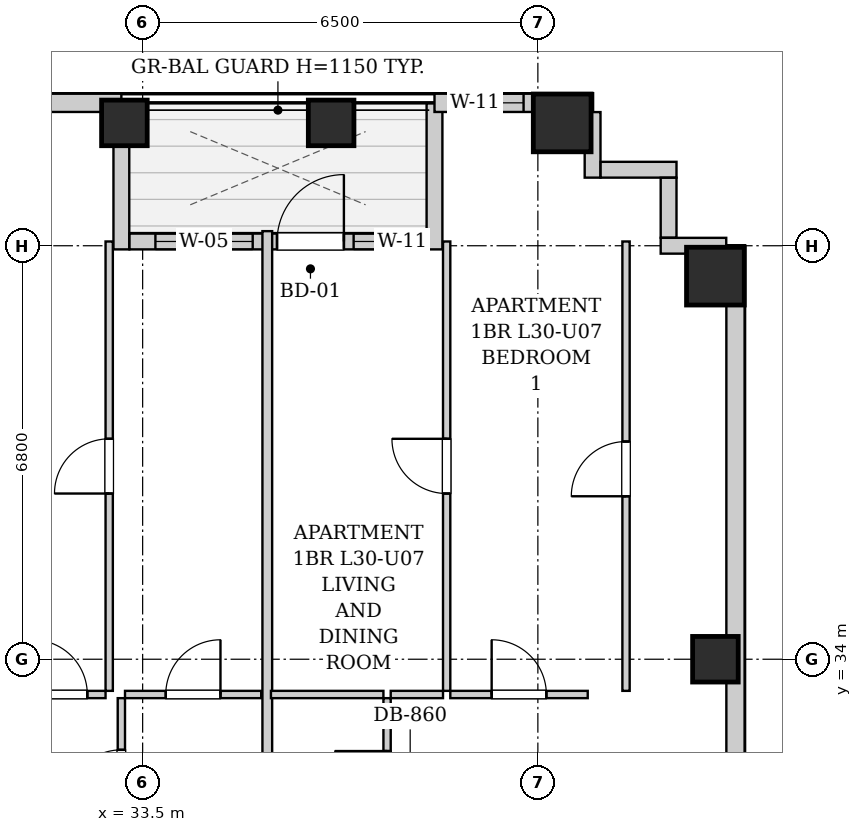
"""IFC4 building model, lengths in metres.
Left out: names, types, materials, properties, quantities, classifications, styles, units other than length and angle.
Written with IfcOpenShell. Run it as: python <this file> out.ifc"""

import sys

from ifc_helpers import new_model, si_unit, direction, frame, frame_2d, origin, origin_2d, place, context, subcontext, project, spatial, rectangle, extrude, element, fill, save


model = new_model("IFC4")
c1 = context("Model", 3, precision=1e-05, world=origin(), true_north=direction((0.0, 1.0)))
c2 = subcontext(c1, "Body", "Model", "MODEL_VIEW")
j1 = project(units=[si_unit("LENGTHUNIT", "METRE"), si_unit("PLANEANGLEUNIT", "RADIAN")], contexts=[c1])
p1 = place(None, origin())
s1 = spatial("IfcSite", under=j1, at=p1, CompositionType="ELEMENT")
p2 = place(p1, origin())
s2 = spatial("IfcBuilding", under=s1, at=p2, CompositionType="ELEMENT")
p3 = place(p2, frame((0.0, 0.0, 107.1)))
s3 = spatial("IfcBuildingStorey", under=s2, at=p3, CompositionType="ELEMENT", Elevation=107.1)
for number, where, z_axis, x_axis in (
    (1, (33.2, 42.82, 0.0), (0.0, 0.0, 1.0), (1.0, 0.0, 0.0)),
    (2, (36.6, 42.82, 0.0), (0.0, 0.0, 1.0), (1.0, 0.0, 0.0)),
):
    element("IfcColumn", number, at=place(p3, frame(where, z_axis=z_axis, x_axis=x_axis)), inside=s3, PredefinedType="COLUMN", context=c2, shape_type="SweptSolid", body=[
        extrude(rectangle(XDim=0.75, YDim=0.75, at=origin_2d()), origin(), (0.0, 0.0, 1.0), 3.2),
    ])
p4 = place(p3, frame((40.4, 42.82, 0.0), z_axis=(0.0, 0.0, 1.0), x_axis=(1.0, 0.0, 0.0)))
e3 = element("IfcColumn", 3, at=p4, inside=s3, PredefinedType="COLUMN", context=c2, shape_type="SweptSolid", body=[
    extrude(rectangle(XDim=0.95, YDim=0.95, at=origin_2d()), origin(), (0.0, 0.0, 1.0), 3.2),
])
p5 = place(p3, frame((42.92, 34.0, 0.0), z_axis=(0.0, 0.0, 1.0), x_axis=(1.0, 0.0, 0.0)))
e4 = element("IfcColumn", 4, at=p5, inside=s3, PredefinedType="COLUMN", context=c2, shape_type="SweptSolid", body=[
    extrude(rectangle(XDim=0.75, YDim=0.75, at=origin_2d()), origin(), (0.0, 0.0, 1.0), 3.2),
])
p6 = place(p3, frame((42.92, 40.3, 0.0), z_axis=(0.0, 0.0, 1.0), x_axis=(1.0, 0.0, 0.0)))
e5 = element("IfcColumn", 5, at=p6, inside=s3, PredefinedType="COLUMN", context=c2, shape_type="SweptSolid", body=[
    extrude(rectangle(XDim=0.95, YDim=0.95, at=origin_2d()), origin(), (0.0, 0.0, 1.0), 3.2),
])
p7 = place(p3, frame((10.0, 43.15, 0.0), z_axis=(0.0, 0.0, 1.0), x_axis=(1.0, 0.0, 0.0)))
e6 = element("IfcWall", 6, at=p7, inside=s3, PredefinedType="SOLIDWALL", context=c2, shape_type="SweptSolid", body=[
    extrude(rectangle(XDim=23.15, YDim=0.3, at=frame_2d((11.575, 0.0))), origin(), (0.0, 0.0, 1.0), 2.94),
])
p8 = place(p7, frame((4.735, 0.0, 0.55)))
e7 = element("IfcOpeningElement", 7, at=p8, cuts=e6, PredefinedType="OPENING", context=c2, shape_type="SweptSolid", body=[
    extrude(rectangle(XDim=1.35, YDim=1.2, at=frame_2d((0.675, 0.6))), frame((0.0, 0.16, 0.0), z_axis=(0.0, -1.0, 0.0), x_axis=(1.0, 0.0, 0.0)), (0.0, 0.0, 1.0), 0.32),
])
p9 = place(p7, frame((1.27, 0.0, 0.55)))
e8 = element("IfcOpeningElement", 8, at=p9, cuts=e6, PredefinedType="OPENING", context=c2, shape_type="SweptSolid", body=[
    extrude(rectangle(XDim=1.35, YDim=1.2, at=frame_2d((0.675, 0.6))), frame((0.0, 0.16, 0.0), z_axis=(0.0, -1.0, 0.0), x_axis=(1.0, 0.0, 0.0)), (0.0, 0.0, 1.0), 0.32),
])
p10 = place(p7, frame((9.773, 0.0, 0.55)))
e9 = element("IfcOpeningElement", 9, at=p10, cuts=e6, PredefinedType="OPENING", context=c2, shape_type="SweptSolid", body=[
    extrude(rectangle(XDim=1.35, YDim=1.2, at=frame_2d((0.675, 0.6))), frame((0.0, 0.16, 0.0), z_axis=(0.0, -1.0, 0.0), x_axis=(1.0, 0.0, 0.0)), (0.0, 0.0, 1.0), 0.32),
])
p11 = place(p7, frame((17.5, 0.0, 0.55)))
e10 = element("IfcOpeningElement", 10, at=p11, cuts=e6, PredefinedType="OPENING", context=c2, shape_type="SweptSolid", body=[
    extrude(rectangle(XDim=0.85, YDim=1.2, at=frame_2d((0.425, 0.6))), frame((0.0, 0.16, 0.0), z_axis=(0.0, -1.0, 0.0), x_axis=(1.0, 0.0, 0.0)), (0.0, 0.0, 1.0), 0.32),
])
p12 = place(p7, frame((19.393, 0.0, 0.55)))
e11 = element("IfcOpeningElement", 11, at=p12, cuts=e6, PredefinedType="OPENING", context=c2, shape_type="SweptSolid", body=[
    extrude(rectangle(XDim=1.35, YDim=1.2, at=frame_2d((0.675, 0.6))), frame((0.0, 0.16, 0.0), z_axis=(0.0, -1.0, 0.0), x_axis=(1.0, 0.0, 0.0)), (0.0, 0.0, 1.0), 0.32),
])
p13 = place(p3, frame((33.15, 43.14, 0.0), z_axis=(0.0, 0.0, 1.0), x_axis=(0.0, -1.0, 0.0)))
e12 = element("IfcWall", 12, at=p13, inside=s3, PredefinedType="SOLIDWALL", context=c2, shape_type="SweptSolid", body=[
    extrude(rectangle(XDim=2.4, YDim=0.26, at=frame_2d((1.2, 0.0))), origin(), (0.0, 0.0, 1.0), 2.313),
])
p14 = place(p3, frame((33.284, 40.87, 0.0), z_axis=(0.0, 0.0, 1.0), x_axis=(1.0, 0.0, 0.0)))
e13 = element("IfcWall", 13, at=p14, inside=s3, PredefinedType="SOLIDWALL", context=c2, shape_type="SweptSolid", body=[
    extrude(rectangle(XDim=4.882, YDim=0.26, at=frame_2d((2.441, 0.0))), origin(), (0.0, 0.0, 1.0), 2.94),
])
p15 = place(p14, frame((2.426, 0.0, 0.0)))
e14 = element("IfcOpeningElement", 14, at=p15, cuts=e13, PredefinedType="OPENING", context=c2, shape_type="SweptSolid", body=[
    extrude(rectangle(XDim=1.1, YDim=2.0, at=frame_2d((0.55, 1.0))), frame((0.0, 0.14, 0.0), z_axis=(0.0, -1.0, 0.0), x_axis=(1.0, 0.0, 0.0)), (0.0, 0.0, 1.0), 0.28),
])
p16 = place(p14, frame((0.426, 0.0, 0.85)))
e15 = element("IfcOpeningElement", 15, at=p16, cuts=e13, PredefinedType="OPENING", context=c2, shape_type="SweptSolid", body=[
    extrude(rectangle(XDim=1.6, YDim=1.65, at=frame_2d((0.8, 0.825))), frame((0.0, 0.14, 0.0), z_axis=(0.0, -1.0, 0.0), x_axis=(1.0, 0.0, 0.0)), (0.0, 0.0, 1.0), 0.28),
])
p17 = place(p14, frame((3.686, 0.0, 0.55)))
e16 = element("IfcOpeningElement", 16, at=p17, cuts=e13, PredefinedType="OPENING", context=c2, shape_type="SweptSolid", body=[
    extrude(rectangle(XDim=0.85, YDim=1.2, at=frame_2d((0.425, 0.6))), frame((0.0, 0.14, 0.0), z_axis=(0.0, -1.0, 0.0), x_axis=(1.0, 0.0, 0.0)), (0.0, 0.0, 1.0), 0.28),
])
p18 = place(p3, frame((38.3, 40.74, 0.0), z_axis=(0.0, 0.0, 1.0), x_axis=(0.0, 1.0, 0.0)))
e17 = element("IfcWall", 17, at=p18, inside=s3, PredefinedType="SOLIDWALL", context=c2, shape_type="SweptSolid", body=[
    extrude(rectangle(XDim=2.4, YDim=0.26, at=frame_2d((1.2, 0.0))), origin(), (0.0, 0.0, 1.0), 2.94),
])
p19 = place(p3, frame((38.3, 43.15, 0.0), z_axis=(0.0, 0.0, 1.0), x_axis=(1.0, 0.0, 0.0)))
e18 = element("IfcWall", 18, at=p19, inside=s3, PredefinedType="SOLIDWALL", context=c2, shape_type="SweptSolid", body=[
    extrude(rectangle(XDim=2.6, YDim=0.3, at=frame_2d((1.3, 0.0))), origin(), (0.0, 0.0, 1.0), 2.94),
])
p20 = place(p19, frame((0.615, 0.0, 0.55)))
e19 = element("IfcOpeningElement", 19, at=p20, cuts=e18, PredefinedType="OPENING", context=c2, shape_type="SweptSolid", body=[
    extrude(rectangle(XDim=0.85, YDim=1.2, at=frame_2d((0.425, 0.6))), frame((0.0, 0.16, 0.0), z_axis=(0.0, -1.0, 0.0), x_axis=(1.0, 0.0, 0.0)), (0.0, 0.0, 1.0), 0.32),
])
p21 = place(p3, frame((43.25, 40.8, 0.0), z_axis=(0.0, 0.0, 1.0), x_axis=(0.0, -1.0, 0.0)))
e20 = element("IfcWall", 20, at=p21, inside=s3, PredefinedType="SOLIDWALL", context=c2, shape_type="SweptSolid", body=[
    extrude(rectangle(XDim=38.3, YDim=0.3, at=frame_2d((19.15, 0.0))), origin(), (0.0, 0.0, 1.0), 2.94),
])
p22 = place(p21, frame((33.495, 0.0, 0.55)))
e21 = element("IfcOpeningElement", 21, at=p22, cuts=e20, PredefinedType="OPENING", context=c2, shape_type="SweptSolid", body=[
    extrude(rectangle(XDim=1.35, YDim=1.2, at=frame_2d((0.675, 0.6))), frame((0.0, 0.16, 0.0), z_axis=(0.0, -1.0, 0.0), x_axis=(1.0, 0.0, 0.0)), (0.0, 0.0, 1.0), 0.32),
])
p23 = place(p21, frame((31.735, 0.0, 0.55)))
e22 = element("IfcOpeningElement", 22, at=p23, cuts=e20, PredefinedType="OPENING", context=c2, shape_type="SweptSolid", body=[
    extrude(rectangle(XDim=1.35, YDim=1.2, at=frame_2d((0.675, 0.6))), frame((0.0, 0.16, 0.0), z_axis=(0.0, -1.0, 0.0), x_axis=(1.0, 0.0, 0.0)), (0.0, 0.0, 1.0), 0.32),
])
p24 = place(p21, frame((21.93, 0.0, 0.55)))
e23 = element("IfcOpeningElement", 23, at=p24, cuts=e20, PredefinedType="OPENING", context=c2, shape_type="SweptSolid", body=[
    extrude(rectangle(XDim=1.35, YDim=1.2, at=frame_2d((0.675, 0.6))), frame((0.0, 0.16, 0.0), z_axis=(0.0, -1.0, 0.0), x_axis=(1.0, 0.0, 0.0)), (0.0, 0.0, 1.0), 0.32),
])
p25 = place(p21, frame((23.54, 0.0, 0.55)))
e24 = element("IfcOpeningElement", 24, at=p25, cuts=e20, PredefinedType="OPENING", context=c2, shape_type="SweptSolid", body=[
    extrude(rectangle(XDim=1.35, YDim=1.2, at=frame_2d((0.675, 0.6))), frame((0.0, 0.16, 0.0), z_axis=(0.0, -1.0, 0.0), x_axis=(1.0, 0.0, 0.0)), (0.0, 0.0, 1.0), 0.32),
])
p26 = place(p21, frame((14.95, 0.0, 0.55)))
e25 = element("IfcOpeningElement", 25, at=p26, cuts=e20, PredefinedType="OPENING", context=c2, shape_type="SweptSolid", body=[
    extrude(rectangle(XDim=1.35, YDim=1.2, at=frame_2d((0.675, 0.6))), frame((0.0, 0.16, 0.0), z_axis=(0.0, -1.0, 0.0), x_axis=(1.0, 0.0, 0.0)), (0.0, 0.0, 1.0), 0.32),
])
p27 = place(p21, frame((12.335, 0.0, 0.55)))
e26 = element("IfcOpeningElement", 26, at=p27, cuts=e20, PredefinedType="OPENING", context=c2, shape_type="SweptSolid", body=[
    extrude(rectangle(XDim=1.35, YDim=1.2, at=frame_2d((0.675, 0.6))), frame((0.0, 0.16, 0.0), z_axis=(0.0, -1.0, 0.0), x_axis=(1.0, 0.0, 0.0)), (0.0, 0.0, 1.0), 0.32),
])
p28 = place(p3, frame((40.9, 42.998, 0.0), z_axis=(0.0, 0.0, 1.0), x_axis=(0.0, -1.0, 0.0)))
e27 = element("IfcWall", 27, at=p28, inside=s3, PredefinedType="SOLIDWALL", context=c2, shape_type="SweptSolid", body=[
    extrude(rectangle(XDim=1.078, YDim=0.26, at=frame_2d((0.539, 0.0))), origin(), (0.0, 0.0, 1.0), 2.94),
])
p29 = place(p3, frame((41.032, 42.05, 0.0), z_axis=(0.0, 0.0, 1.0), x_axis=(1.0, 0.0, 0.0)))
e28 = element("IfcWall", 28, at=p29, inside=s3, PredefinedType="SOLIDWALL", context=c2, shape_type="SweptSolid", body=[
    extrude(rectangle(XDim=1.248, YDim=0.26, at=frame_2d((0.624, 0.0))), origin(), (0.0, 0.0, 1.0), 2.94),
])
p30 = place(p3, frame((42.15, 41.918, 0.0), z_axis=(0.0, 0.0, 1.0), x_axis=(0.0, -1.0, 0.0)))
e29 = element("IfcWall", 29, at=p30, inside=s3, PredefinedType="SOLIDWALL", context=c2, shape_type="SweptSolid", body=[
    extrude(rectangle(XDim=0.986, YDim=0.26, at=frame_2d((0.493, 0.0))), origin(), (0.0, 0.0, 1.0), 2.94),
])
p31 = place(p3, frame((42.02, 40.8, 0.0), z_axis=(0.0, 0.0, 1.0), x_axis=(1.0, 0.0, 0.0)))
e30 = element("IfcWall", 30, at=p31, inside=s3, PredefinedType="SOLIDWALL", context=c2, shape_type="SweptSolid", body=[
    extrude(rectangle(XDim=1.078, YDim=0.26, at=frame_2d((0.539, 0.0))), origin(), (0.0, 0.0, 1.0), 2.94),
])
p32 = place(p3, frame((33.15, 30.76, 0.0), z_axis=(0.0, 0.0, 1.0), x_axis=(0.0, 1.0, 0.0)))
e31 = element("IfcWall", 31, at=p32, inside=s3, PredefinedType="PARTITIONING", context=c2, shape_type="SweptSolid", body=[
    extrude(rectangle(XDim=2.6, YDim=0.12, at=frame_2d((1.3, 0.0))), origin(), (0.0, 0.0, 1.0), 2.313),
])
p33 = place(p32, frame((0.85, 0.0, 0.0)))
e32 = element("IfcOpeningElement", 32, at=p33, cuts=e31, PredefinedType="OPENING", context=c2, shape_type="SweptSolid", body=[
    extrude(rectangle(XDim=0.9, YDim=2.05, at=frame_2d((0.45, 1.025))), frame((0.0, 0.07, 0.0), z_axis=(0.0, -1.0, 0.0), x_axis=(1.0, 0.0, 0.0)), (0.0, 0.0, 1.0), 0.14),
])
p34 = place(p3, frame((31.39, 33.42, 0.0), z_axis=(0.0, 0.0, 1.0), x_axis=(1.0, 0.0, 0.0)))
e33 = element("IfcWall", 33, at=p34, inside=s3, PredefinedType="PARTITIONING", context=c2, shape_type="SweptSolid", body=[
    extrude(rectangle(XDim=1.5, YDim=0.12, at=frame_2d((0.75, 0.0))), origin(), (0.0, 0.0, 1.0), 2.94),
])
p35 = place(p34, frame((0.3, 0.0, 0.0)))
e34 = element("IfcOpeningElement", 34, at=p35, cuts=e33, PredefinedType="OPENING", context=c2, shape_type="SweptSolid", body=[
    extrude(rectangle(XDim=0.9, YDim=2.05, at=frame_2d((0.45, 1.025))), frame((0.0, 0.07, 0.0), z_axis=(0.0, -1.0, 0.0), x_axis=(1.0, 0.0, 0.0)), (0.0, 0.0, 1.0), 0.14),
])
p36 = place(p3, frame((33.21, 33.42, 0.0), z_axis=(0.0, 0.0, 1.0), x_axis=(1.0, 0.0, 0.0)))
e35 = element("IfcWall", 35, at=p36, inside=s3, PredefinedType="PARTITIONING", context=c2, shape_type="SweptSolid", body=[
    extrude(rectangle(XDim=2.24, YDim=0.12, at=frame_2d((1.12, 0.0))), origin(), (0.0, 0.0, 1.0), 2.94),
])
p37 = place(p36, frame((0.67, 0.0, 0.0)))
e36 = element("IfcOpeningElement", 36, at=p37, cuts=e35, PredefinedType="OPENING", context=c2, shape_type="SweptSolid", body=[
    extrude(rectangle(XDim=0.9, YDim=2.05, at=frame_2d((0.45, 1.025))), frame((0.0, 0.07, 0.0), z_axis=(0.0, -1.0, 0.0), x_axis=(1.0, 0.0, 0.0)), (0.0, 0.0, 1.0), 0.14),
])
p38 = place(p3, frame((32.95, 33.48, 0.0), z_axis=(0.0, 0.0, 1.0), x_axis=(0.0, 1.0, 0.0)))
e37 = element("IfcWall", 37, at=p38, inside=s3, PredefinedType="PARTITIONING", context=c2, shape_type="SweptSolid", body=[
    extrude(rectangle(XDim=7.39, YDim=0.12, at=frame_2d((3.695, 0.0))), origin(), (0.0, 0.0, 1.0), 2.94),
])
p39 = place(p38, frame((3.245, 0.0, 0.0)))
e38 = element("IfcOpeningElement", 38, at=p39, cuts=e37, PredefinedType="OPENING", context=c2, shape_type="SweptSolid", body=[
    extrude(rectangle(XDim=0.9, YDim=2.05, at=frame_2d((0.45, 1.025))), frame((0.0, 0.07, 0.0), z_axis=(0.0, -1.0, 0.0), x_axis=(1.0, 0.0, 0.0)), (0.0, 0.0, 1.0), 0.14),
])
p40 = place(p3, frame((35.55, 30.76, 0.0), z_axis=(0.0, 0.0, 1.0), x_axis=(0.0, 1.0, 0.0)))
e39 = element("IfcWall", 39, at=p40, inside=s3, PredefinedType="PARTITIONING", context=c2, shape_type="SweptSolid", body=[
    extrude(rectangle(XDim=10.28, YDim=0.16, at=frame_2d((5.14, 0.0))), origin(), (0.0, 0.0, 1.0), 2.94),
])
p41 = place(p3, frame((37.52, 30.76, 0.0), z_axis=(0.0, 0.0, 1.0), x_axis=(0.0, 1.0, 0.0)))
e40 = element("IfcWall", 40, at=p41, inside=s3, PredefinedType="PARTITIONING", context=c2, shape_type="SweptSolid", body=[
    extrude(rectangle(XDim=2.6, YDim=0.12, at=frame_2d((1.3, 0.0))), origin(), (0.0, 0.0, 1.0), 2.94),
])
p42 = place(p41, frame((0.87, 0.0, 0.0)))
e41 = element("IfcOpeningElement", 41, at=p42, cuts=e40, PredefinedType="OPENING", context=c2, shape_type="SweptSolid", body=[
    extrude(rectangle(XDim=0.86, YDim=2.05, at=frame_2d((0.43, 1.025))), frame((0.0, 0.07, 0.0), z_axis=(0.0, -1.0, 0.0), x_axis=(1.0, 0.0, 0.0)), (0.0, 0.0, 1.0), 0.14),
])
p43 = place(p3, frame((35.61, 33.42, 0.0), z_axis=(0.0, 0.0, 1.0), x_axis=(1.0, 0.0, 0.0)))
e42 = element("IfcWall", 42, at=p43, inside=s3, PredefinedType="PARTITIONING", context=c2, shape_type="SweptSolid", body=[
    extrude(rectangle(XDim=1.85, YDim=0.12, at=frame_2d((0.925, 0.0))), origin(), (0.0, 0.0, 1.0), 2.94),
])
p44 = place(p3, frame((37.58, 33.42, 0.0), z_axis=(0.0, 0.0, 1.0), x_axis=(1.0, 0.0, 0.0)))
e43 = element("IfcWall", 43, at=p44, inside=s3, PredefinedType="PARTITIONING", context=c2, shape_type="SweptSolid", body=[
    extrude(rectangle(XDim=0.86, YDim=0.12, at=frame_2d((0.43, 0.0))), origin(), (0.0, 0.0, 1.0), 2.94),
])
p45 = place(p3, frame((38.56, 33.42, 0.0), z_axis=(0.0, 0.0, 1.0), x_axis=(1.0, 0.0, 0.0)))
e44 = element("IfcWall", 44, at=p45, inside=s3, PredefinedType="PARTITIONING", context=c2, shape_type="SweptSolid", body=[
    extrude(rectangle(XDim=2.26, YDim=0.12, at=frame_2d((1.13, 0.0))), origin(), (0.0, 0.0, 1.0), 2.94),
])
p46 = place(p45, frame((0.68, 0.0, 0.0)))
e45 = element("IfcOpeningElement", 45, at=p46, cuts=e44, PredefinedType="OPENING", context=c2, shape_type="SweptSolid", body=[
    extrude(rectangle(XDim=0.9, YDim=2.05, at=frame_2d((0.45, 1.025))), frame((0.0, 0.07, 0.0), z_axis=(0.0, -1.0, 0.0), x_axis=(1.0, 0.0, 0.0)), (0.0, 0.0, 1.0), 0.14),
])
p47 = place(p3, frame((38.5, 33.48, 0.0), z_axis=(0.0, 0.0, 1.0), x_axis=(0.0, 1.0, 0.0)))
e46 = element("IfcWall", 46, at=p47, inside=s3, PredefinedType="PARTITIONING", context=c2, shape_type="SweptSolid", body=[
    extrude(rectangle(XDim=7.39, YDim=0.12, at=frame_2d((3.695, 0.0))), origin(), (0.0, 0.0, 1.0), 2.94),
])
p48 = place(p47, frame((3.245, 0.0, 0.0)))
e47 = element("IfcOpeningElement", 47, at=p48, cuts=e46, PredefinedType="OPENING", context=c2, shape_type="SweptSolid", body=[
    extrude(rectangle(XDim=0.9, YDim=2.05, at=frame_2d((0.45, 1.025))), frame((0.0, 0.07, 0.0), z_axis=(0.0, -1.0, 0.0), x_axis=(1.0, 0.0, 0.0)), (0.0, 0.0, 1.0), 0.14),
])
p49 = place(p3, frame((41.45, 33.48, 0.0), z_axis=(0.0, 0.0, 1.0), x_axis=(0.0, 1.0, 0.0)))
e48 = element("IfcWall", 48, at=p49, inside=s3, PredefinedType="PARTITIONING", context=c2, shape_type="SweptSolid", body=[
    extrude(rectangle(XDim=7.39, YDim=0.12, at=frame_2d((3.695, 0.0))), origin(), (0.0, 0.0, 1.0), 2.94),
])
p50 = place(p49, frame((3.2, 0.0, 0.0)))
e49 = element("IfcOpeningElement", 49, at=p50, cuts=e48, PredefinedType="OPENING", context=c2, shape_type="SweptSolid", body=[
    extrude(rectangle(XDim=0.9, YDim=2.05, at=frame_2d((0.45, 1.025))), frame((0.0, 0.07, 0.0), z_axis=(0.0, -1.0, 0.0), x_axis=(1.0, 0.0, 0.0)), (0.0, 0.0, 1.0), 0.14),
])
p51 = place(p33, origin())
e50 = element("IfcDoor", 50, at=p51, inside=s3, OperationType="SINGLE_SWING_LEFT", PredefinedType="DOOR", context=c2, shape_type="SweptSolid", body=[
    extrude(rectangle(XDim=0.9, YDim=2.05, at=frame_2d((0.45, 1.025))), frame((0.0, 0.025, 0.0), z_axis=(0.0, -1.0, 0.0), x_axis=(1.0, 0.0, 0.0)), (0.0, 0.0, 1.0), 0.05),
])
fill(e32, e50)
p52 = place(p35, origin())
e51 = element("IfcDoor", 51, at=p52, inside=s3, OperationType="SINGLE_SWING_LEFT", PredefinedType="DOOR", context=c2, shape_type="SweptSolid", body=[
    extrude(rectangle(XDim=0.9, YDim=2.05, at=frame_2d((0.45, 1.025))), frame((0.0, 0.025, 0.0), z_axis=(0.0, -1.0, 0.0), x_axis=(1.0, 0.0, 0.0)), (0.0, 0.0, 1.0), 0.05),
])
fill(e34, e51)
p53 = place(p37, origin())
e52 = element("IfcDoor", 52, at=p53, inside=s3, OperationType="SINGLE_SWING_RIGHT", PredefinedType="DOOR", context=c2, shape_type="SweptSolid", body=[
    extrude(rectangle(XDim=0.9, YDim=2.05, at=frame_2d((0.45, 1.025))), frame((0.0, 0.025, 0.0), z_axis=(0.0, -1.0, 0.0), x_axis=(1.0, 0.0, 0.0)), (0.0, 0.0, 1.0), 0.05),
])
fill(e36, e52)
p54 = place(p39, origin())
e53 = element("IfcDoor", 53, at=p54, inside=s3, OperationType="SINGLE_SWING_LEFT", PredefinedType="DOOR", context=c2, shape_type="SweptSolid", body=[
    extrude(rectangle(XDim=0.9, YDim=2.05, at=frame_2d((0.45, 1.025))), frame((0.0, 0.025, 0.0), z_axis=(0.0, -1.0, 0.0), x_axis=(1.0, 0.0, 0.0)), (0.0, 0.0, 1.0), 0.05),
])
fill(e38, e53)
p55 = place(p42, origin())
e54 = element("IfcDoor", 54, at=p55, inside=s3, OperationType="SINGLE_SWING_RIGHT", PredefinedType="DOOR", context=c2, shape_type="SweptSolid", body=[
    extrude(rectangle(XDim=0.86, YDim=2.05, at=frame_2d((0.43, 1.025))), frame((0.0, 0.025, 0.0), z_axis=(0.0, -1.0, 0.0), x_axis=(1.0, 0.0, 0.0)), (0.0, 0.0, 1.0), 0.05),
])
fill(e41, e54)
p56 = place(p46, origin())
e55 = element("IfcDoor", 55, at=p56, inside=s3, OperationType="SINGLE_SWING_LEFT", PredefinedType="DOOR", context=c2, shape_type="SweptSolid", body=[
    extrude(rectangle(XDim=0.9, YDim=2.05, at=frame_2d((0.45, 1.025))), frame((0.0, 0.025, 0.0), z_axis=(0.0, -1.0, 0.0), x_axis=(1.0, 0.0, 0.0)), (0.0, 0.0, 1.0), 0.05),
])
fill(e45, e55)
p57 = place(p48, origin())
e56 = element("IfcDoor", 56, at=p57, inside=s3, OperationType="SINGLE_SWING_RIGHT", PredefinedType="DOOR", context=c2, shape_type="SweptSolid", body=[
    extrude(rectangle(XDim=0.9, YDim=2.05, at=frame_2d((0.45, 1.025))), frame((0.0, 0.025, 0.0), z_axis=(0.0, -1.0, 0.0), x_axis=(1.0, 0.0, 0.0)), (0.0, 0.0, 1.0), 0.05),
])
fill(e47, e56)
p58 = place(p50, origin())
e57 = element("IfcDoor", 57, at=p58, inside=s3, OperationType="SINGLE_SWING_LEFT", PredefinedType="DOOR", context=c2, shape_type="SweptSolid", body=[
    extrude(rectangle(XDim=0.9, YDim=2.05, at=frame_2d((0.45, 1.025))), frame((0.0, 0.025, 0.0), z_axis=(0.0, -1.0, 0.0), x_axis=(1.0, 0.0, 0.0)), (0.0, 0.0, 1.0), 0.05),
])
fill(e49, e57)
p59 = place(p15, origin())
e58 = element("IfcDoor", 58, at=p59, inside=s3, OperationType="SINGLE_SWING_RIGHT", PredefinedType="DOOR", context=c2, shape_type="SweptSolid", body=[
    extrude(rectangle(XDim=1.1, YDim=2.0, at=frame_2d((0.55, 1.0))), frame((0.0, 0.025, 0.0), z_axis=(0.0, -1.0, 0.0), x_axis=(1.0, 0.0, 0.0)), (0.0, 0.0, 1.0), 0.05),
])
fill(e14, e58)
p60 = place(p16, origin())
e59 = element("IfcWindow", 59, at=p60, inside=s3, PartitioningType="DOUBLE_PANEL_VERTICAL", PredefinedType="WINDOW", context=c2, shape_type="SweptSolid", body=[
    extrude(rectangle(XDim=1.6, YDim=1.65, at=frame_2d((0.8, 0.825))), frame((0.0, 0.03, 0.0), z_axis=(0.0, -1.0, 0.0), x_axis=(1.0, 0.0, 0.0)), (0.0, 0.0, 1.0), 0.06),
])
fill(e15, e59)
p61 = place(p17, origin())
e60 = element("IfcWindow", 60, at=p61, inside=s3, PartitioningType="SINGLE_PANEL", PredefinedType="WINDOW", context=c2, shape_type="SweptSolid", body=[
    extrude(rectangle(XDim=0.85, YDim=1.2, at=frame_2d((0.425, 0.6))), frame((0.0, 0.03, 0.0), z_axis=(0.0, -1.0, 0.0), x_axis=(1.0, 0.0, 0.0)), (0.0, 0.0, 1.0), 0.06),
])
fill(e16, e60)
p62 = place(p20, origin())
e61 = element("IfcWindow", 61, at=p62, inside=s3, PartitioningType="SINGLE_PANEL", PredefinedType="WINDOW", context=c2, shape_type="SweptSolid", body=[
    extrude(rectangle(XDim=0.85, YDim=1.2, at=frame_2d((0.425, 0.6))), frame((0.0, 0.03, 0.0), z_axis=(0.0, -1.0, 0.0), x_axis=(1.0, 0.0, 0.0)), (0.0, 0.0, 1.0), 0.06),
])
fill(e19, e61)
save(model, sys.argv[1])
